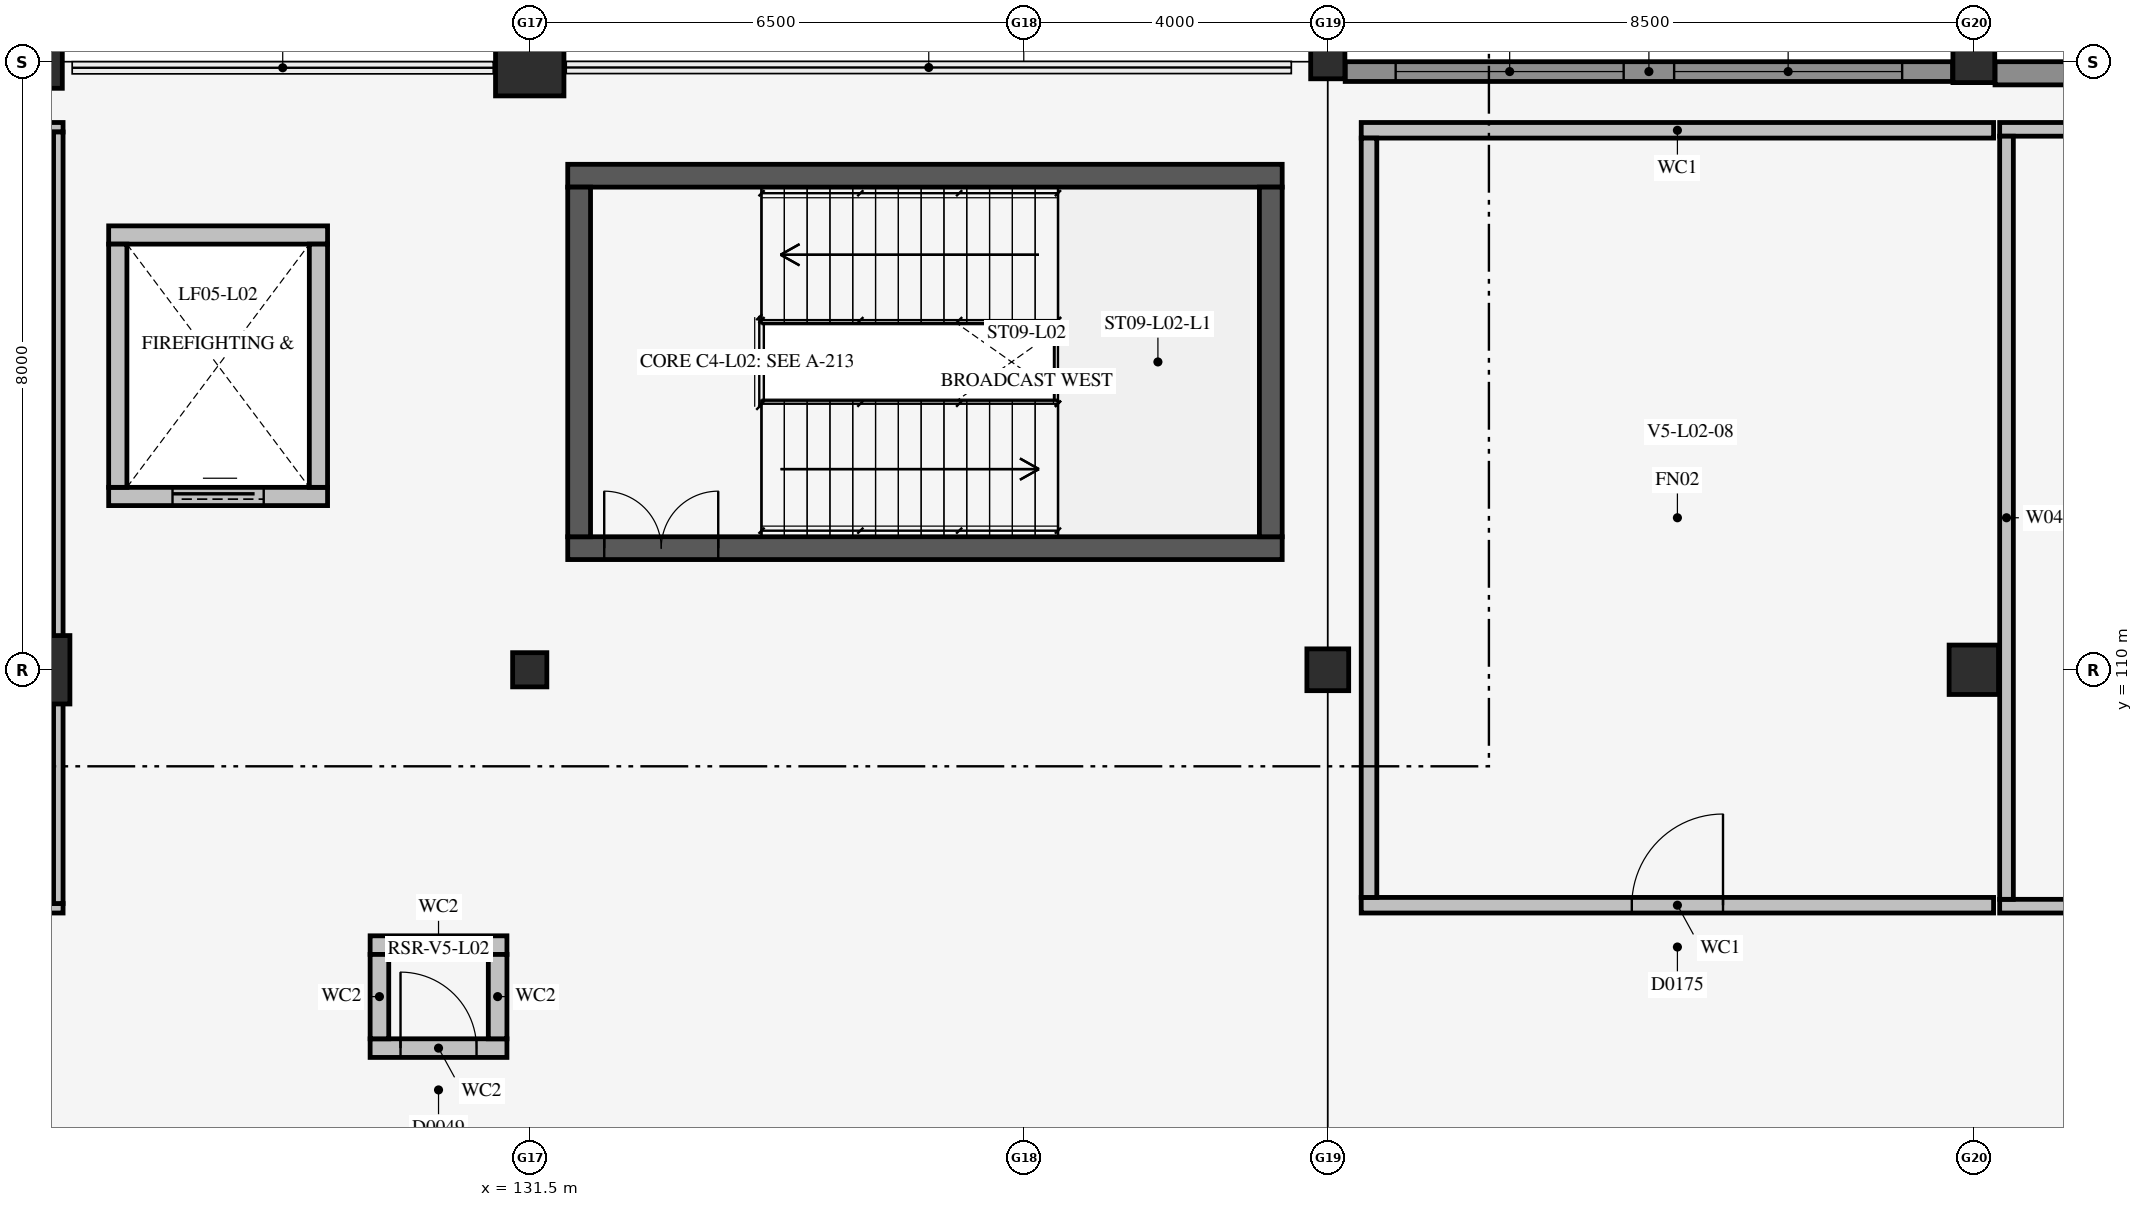
"""IFC4 building model, lengths in metres.
Left out: names, types, materials, properties, quantities, classifications, styles, units other than length and angle.
Written with IfcOpenShell. Run it as: python <this file> out.ifc"""

import sys

from ifc_helpers import new_model, si_unit, direction, frame, frame_2d, origin, origin_2d, place, context, subcontext, project, spatial, rectangle, circle, extrude, element, fill, save


model = new_model("IFC4")
c1 = context("Model", 3, precision=1e-05, world=origin(), true_north=direction((0.0, 1.0)))
c2 = subcontext(c1, "Body", "Model", "MODEL_VIEW")
j1 = project(units=[si_unit("LENGTHUNIT", "METRE"), si_unit("PLANEANGLEUNIT", "RADIAN")], contexts=[c1])
p1 = place(None, origin())
s1 = spatial("IfcSite", under=j1, at=p1, CompositionType="ELEMENT")
p2 = place(p1, origin())
s2 = spatial("IfcBuilding", under=s1, at=p2, CompositionType="ELEMENT")
p3 = place(p2, frame((0.0, 0.0, 10.2)))
s3 = spatial("IfcBuildingStorey", under=s2, at=p3, CompositionType="ELEMENT", Elevation=10.2)
p4 = place(p3, frame((132.0, 111.6, 0.0), z_axis=(0.0, 0.0, 1.0), x_axis=(1.0, 0.0, 0.0)))
e1 = element("IfcWall", 1, at=p4, inside=s3, PredefinedType="SHEAR", context=c2, shape_type="SweptSolid", body=[
    extrude(rectangle(XDim=9.4, YDim=0.3, at=frame_2d((4.7, 0.0))), origin(), (0.0, 0.0, 1.0), 4.38),
])
p5 = place(p4, frame((0.48, 0.0, 0.0)))
e2 = element("IfcOpeningElement", 2, at=p5, cuts=e1, PredefinedType="OPENING", context=c2, shape_type="SweptSolid", body=[
    extrude(rectangle(XDim=1.5, YDim=2.3, at=frame_2d((0.75, 1.15))), frame((0.0, 0.162, 0.0), z_axis=(0.0, -1.0, 0.0), x_axis=(1.0, 0.0, 0.0)), (0.0, 0.0, 1.0), 0.324),
])
p6 = place(p3, frame((132.0, 116.5, 0.0), z_axis=(0.0, 0.0, 1.0), x_axis=(1.0, 0.0, 0.0)))
e3 = element("IfcWall", 3, at=p6, inside=s3, PredefinedType="SHEAR", context=c2, shape_type="SweptSolid", body=[
    extrude(rectangle(XDim=9.4, YDim=0.3, at=frame_2d((4.7, 0.0))), origin(), (0.0, 0.0, 1.0), 4.38),
])
for number, where, z_axis, x_axis in (
    (4, (132.15, 111.75, 0.0), (0.0, 0.0, 1.0), (0.0, 1.0, 0.0)),
    (5, (141.25, 111.75, 0.0), (0.0, 0.0, 1.0), (0.0, 1.0, 0.0)),
):
    element("IfcWall", number, at=place(p3, frame(where, z_axis=z_axis, x_axis=x_axis)), inside=s3, PredefinedType="SHEAR", context=c2, shape_type="SweptSolid", body=[
        extrude(rectangle(XDim=4.6, YDim=0.3, at=frame_2d((2.3, 0.0))), origin(), (0.0, 0.0, 1.0), 4.38),
    ])
p7 = place(p3, frame((125.96, 112.28, 0.0), z_axis=(0.0, 0.0, 1.0), x_axis=(1.0, 0.0, 0.0)))
e6 = element("IfcWall", 6, at=p7, inside=s3, PredefinedType="SOLIDWALL", context=c2, shape_type="SweptSolid", body=[
    extrude(rectangle(XDim=2.88, YDim=0.24, at=frame_2d((1.44, 0.0))), origin(), (0.0, 0.0, 1.0), 4.6),
])
p8 = place(p7, frame((0.84, 0.0, 0.0)))
e7 = element("IfcOpeningElement", 7, at=p8, cuts=e6, PredefinedType="OPENING", context=c2, shape_type="SweptSolid", body=[
    extrude(rectangle(XDim=1.2, YDim=2.2, at=frame_2d((0.6, 1.1))), frame((0.0, 0.132, 0.0), z_axis=(0.0, -1.0, 0.0), x_axis=(1.0, 0.0, 0.0)), (0.0, 0.0, 1.0), 0.264),
])
p9 = place(p3, frame((125.96, 115.72, 0.0), z_axis=(0.0, 0.0, 1.0), x_axis=(1.0, 0.0, 0.0)))
e8 = element("IfcWall", 8, at=p9, inside=s3, PredefinedType="SOLIDWALL", context=c2, shape_type="SweptSolid", body=[
    extrude(rectangle(XDim=2.88, YDim=0.24, at=frame_2d((1.44, 0.0))), origin(), (0.0, 0.0, 1.0), 4.6),
])
for number, where, z_axis, x_axis in (
    (9, (126.08, 112.4, 0.0), (0.0, 0.0, 1.0), (0.0, 1.0, 0.0)),
    (10, (128.72, 112.4, 0.0), (0.0, 0.0, 1.0), (0.0, 1.0, 0.0)),
):
    element("IfcWall", number, at=place(p3, frame(where, z_axis=z_axis, x_axis=x_axis)), inside=s3, PredefinedType="SOLIDWALL", context=c2, shape_type="SweptSolid", body=[
        extrude(rectangle(XDim=3.2, YDim=0.24, at=frame_2d((1.6, 0.0))), origin(), (0.0, 0.0, 1.0), 4.6),
    ])
p10 = place(p3, frame((125.0, 110.0, 0.0), z_axis=(0.0, 0.0, 1.0), x_axis=(1.0, 0.0, 0.0)))
e11 = element("IfcColumn", 11, at=p10, inside=s3, PredefinedType="COLUMN", context=c2, shape_type="SweptSolid", body=[
    extrude(circle(Radius=0.45, at=origin_2d()), origin(), (0.0, 0.0, 1.0), 4.6),
])
p11 = place(p3, frame((125.0, 118.0, 0.0), z_axis=(0.0, 0.0, 1.0), x_axis=(1.0, 0.0, 0.0)))
e12 = element("IfcColumn", 12, at=p11, inside=s3, PredefinedType="COLUMN", context=c2, shape_type="SweptSolid", body=[
    extrude(circle(Radius=0.35, at=origin_2d()), origin(), (0.0, 0.0, 1.0), 4.6),
])
p12 = place(p3, frame((131.5, 110.0, 0.0), z_axis=(0.0, 0.0, 1.0), x_axis=(1.0, 0.0, 0.0)))
e13 = element("IfcColumn", 13, at=p12, inside=s3, PredefinedType="COLUMN", context=c2, shape_type="SweptSolid", body=[
    extrude(rectangle(XDim=0.45, YDim=0.45, at=origin_2d()), origin(), (0.0, 0.0, 1.0), 4.6),
])
p13 = place(p3, frame((131.5, 118.0, 0.0), z_axis=(0.0, 0.0, 1.0), x_axis=(1.0, 0.0, 0.0)))
e14 = element("IfcColumn", 14, at=p13, inside=s3, PredefinedType="COLUMN", context=c2, shape_type="SweptSolid", body=[
    extrude(circle(Radius=0.45, at=origin_2d()), origin(), (0.0, 0.0, 1.0), 4.6),
])
p14 = place(p3, frame((142.0, 110.0, 0.0), z_axis=(0.0, 0.0, 1.0), x_axis=(1.0, 0.0, 0.0)))
e15 = element("IfcColumn", 15, at=p14, inside=s3, PredefinedType="COLUMN", context=c2, shape_type="SweptSolid", body=[
    extrude(rectangle(XDim=0.55, YDim=0.55, at=origin_2d()), origin(), (0.0, 0.0, 1.0), 4.6),
])
p15 = place(p3, frame((142.0, 118.0, 0.0), z_axis=(0.0, 0.0, 1.0), x_axis=(1.0, 0.0, 0.0)))
e16 = element("IfcColumn", 16, at=p15, inside=s3, PredefinedType="COLUMN", context=c2, shape_type="SweptSolid", body=[
    extrude(rectangle(XDim=0.45, YDim=0.45, at=origin_2d()), origin(), (0.0, 0.0, 1.0), 4.6),
])
p16 = place(p3, frame((150.5, 110.0, 0.0), z_axis=(0.0, 0.0, 1.0), x_axis=(1.0, 0.0, 0.0)))
e17 = element("IfcColumn", 17, at=p16, inside=s3, PredefinedType="COLUMN", context=c2, shape_type="SweptSolid", body=[
    extrude(rectangle(XDim=0.65, YDim=0.65, at=origin_2d()), origin(), (0.0, 0.0, 1.0), 4.6),
])
p17 = place(p3, frame((150.5, 118.0, 0.0), z_axis=(0.0, 0.0, 1.0), x_axis=(1.0, 0.0, 0.0)))
e18 = element("IfcColumn", 18, at=p17, inside=s3, PredefinedType="COLUMN", context=c2, shape_type="SweptSolid", body=[
    extrude(rectangle(XDim=0.55, YDim=0.55, at=origin_2d()), origin(), (0.0, 0.0, 1.0), 4.6),
])
p18 = place(p3, frame((129.4, 105.022, 0.0), z_axis=(0.0, 0.0, 1.0), x_axis=(1.0, 0.0, 0.0)))
e19 = element("IfcWall", 19, at=p18, inside=s3, PredefinedType="SOLIDWALL", context=c2, shape_type="SweptSolid", body=[
    extrude(rectangle(XDim=1.8, YDim=0.245, at=frame_2d((0.9, 0.0))), origin(), (0.0, 0.0, 1.0), 4.365),
])
p19 = place(p18, frame((0.4, 0.0, 0.0)))
e20 = element("IfcOpeningElement", 20, at=p19, cuts=e19, PredefinedType="OPENING", context=c2, shape_type="SweptSolid", body=[
    extrude(rectangle(XDim=1.0, YDim=2.2, at=frame_2d((0.5, 1.1))), frame((0.0, 0.135, 0.0), z_axis=(0.0, -1.0, 0.0), x_axis=(1.0, 0.0, 0.0)), (0.0, 0.0, 1.0), 0.269),
])
p20 = place(p3, frame((129.4, 106.377, 0.0), z_axis=(0.0, 0.0, 1.0), x_axis=(1.0, 0.0, 0.0)))
e21 = element("IfcWall", 21, at=p20, inside=s3, PredefinedType="SOLIDWALL", context=c2, shape_type="SweptSolid", body=[
    extrude(rectangle(XDim=1.8, YDim=0.245, at=frame_2d((0.9, 0.0))), origin(), (0.0, 0.0, 1.0), 4.365),
])
for number, where, z_axis, x_axis in (
    (22, (131.077, 105.145, 0.0), (0.0, 0.0, 1.0), (0.0, 1.0, 0.0)),
    (23, (129.522, 105.145, 0.0), (0.0, 0.0, 1.0), (0.0, 1.0, 0.0)),
):
    element("IfcWall", number, at=place(p3, frame(where, z_axis=z_axis, x_axis=x_axis)), inside=s3, PredefinedType="SOLIDWALL", context=c2, shape_type="SweptSolid", body=[
        extrude(rectangle(XDim=1.11, YDim=0.245, at=frame_2d((0.555, 0.0))), origin(), (0.0, 0.0, 1.0), 4.365),
    ])
p21 = place(p3, frame((112.14, 106.863, 0.0), z_axis=(0.0, 0.0, 1.0), x_axis=(1.0, 0.0, 0.0)))
e24 = element("IfcWall", 24, at=p21, inside=s3, PredefinedType="PARTITIONING", context=c2, shape_type="SweptSolid", body=[
    extrude(rectangle(XDim=13.22, YDim=0.125, at=frame_2d((6.61, 0.0))), origin(), (0.0, 0.0, 1.0), 4.365),
])
p22 = place(p21, frame((7.413, 0.0, 0.0)))
e25 = element("IfcOpeningElement", 25, at=p22, cuts=e24, PredefinedType="OPENING", context=c2, shape_type="SweptSolid", body=[
    extrude(rectangle(XDim=1.05, YDim=2.15, at=frame_2d((0.525, 1.075))), frame((0.0, 0.074, 0.0), z_axis=(0.0, -1.0, 0.0), x_axis=(1.0, 0.0, 0.0)), (0.0, 0.0, 1.0), 0.149),
])
p23 = place(p3, frame((112.14, 117.137, 0.0), z_axis=(0.0, 0.0, 1.0), x_axis=(1.0, 0.0, 0.0)))
e26 = element("IfcWall", 26, at=p23, inside=s3, PredefinedType="PARTITIONING", context=c2, shape_type="SweptSolid", body=[
    extrude(rectangle(XDim=13.22, YDim=0.125, at=frame_2d((6.61, 0.0))), origin(), (0.0, 0.0, 1.0), 4.365),
])
p24 = place(p3, frame((125.298, 106.925, 0.0), z_axis=(0.0, 0.0, 1.0), x_axis=(0.0, 1.0, 0.0)))
e27 = element("IfcWall", 27, at=p24, inside=s3, PredefinedType="PARTITIONING", context=c2, shape_type="SweptSolid", body=[
    extrude(rectangle(XDim=10.15, YDim=0.125, at=frame_2d((5.075, 0.0))), origin(), (0.0, 0.0, 1.0), 4.365),
])
p25 = place(p3, frame((142.44, 106.903, 0.0), z_axis=(0.0, 0.0, 1.0), x_axis=(1.0, 0.0, 0.0)))
e28 = element("IfcWall", 28, at=p25, inside=s3, PredefinedType="SOLIDWALL", context=c2, shape_type="SweptSolid", body=[
    extrude(rectangle(XDim=8.32, YDim=0.205, at=frame_2d((4.16, 0.0))), origin(), (0.0, 0.0, 1.0), 4.365),
])
p26 = place(p25, frame((3.56, 0.0, 0.0)))
e29 = element("IfcOpeningElement", 29, at=p26, cuts=e28, PredefinedType="OPENING", context=c2, shape_type="SweptSolid", body=[
    extrude(rectangle(XDim=1.2, YDim=2.2, at=frame_2d((0.6, 1.1))), frame((0.0, 0.115, 0.0), z_axis=(0.0, -1.0, 0.0), x_axis=(1.0, 0.0, 0.0)), (0.0, 0.0, 1.0), 0.229),
])
p27 = place(p3, frame((142.44, 117.097, 0.0), z_axis=(0.0, 0.0, 1.0), x_axis=(1.0, 0.0, 0.0)))
e30 = element("IfcWall", 30, at=p27, inside=s3, PredefinedType="SOLIDWALL", context=c2, shape_type="SweptSolid", body=[
    extrude(rectangle(XDim=8.32, YDim=0.205, at=frame_2d((4.16, 0.0))), origin(), (0.0, 0.0, 1.0), 4.365),
])
p28 = place(p3, frame((142.542, 107.005, 0.0), z_axis=(0.0, 0.0, 1.0), x_axis=(0.0, 1.0, 0.0)))
e31 = element("IfcWall", 31, at=p28, inside=s3, PredefinedType="SOLIDWALL", context=c2, shape_type="SweptSolid", body=[
    extrude(rectangle(XDim=9.99, YDim=0.205, at=frame_2d((4.995, 0.0))), origin(), (0.0, 0.0, 1.0), 4.365),
])
p29 = place(p3, frame((150.84, 106.89, 0.0), z_axis=(0.0, 0.0, 1.0), x_axis=(1.0, 0.0, 0.0)))
e32 = element("IfcWall", 32, at=p29, inside=s3, PredefinedType="PARTITIONING", context=c2, shape_type="SweptSolid", body=[
    extrude(rectangle(XDim=8.32, YDim=0.18, at=frame_2d((4.16, 0.0))), origin(), (0.0, 0.0, 1.0), 4.365),
])
p30 = place(p29, frame((3.66, 0.0, 0.0)))
e33 = element("IfcOpeningElement", 33, at=p30, cuts=e32, PredefinedType="OPENING", context=c2, shape_type="SweptSolid", body=[
    extrude(rectangle(XDim=1.0, YDim=2.2, at=frame_2d((0.5, 1.1))), frame((0.0, 0.102, 0.0), z_axis=(0.0, -1.0, 0.0), x_axis=(1.0, 0.0, 0.0)), (0.0, 0.0, 1.0), 0.204),
])
p31 = place(p3, frame((150.84, 117.11, 0.0), z_axis=(0.0, 0.0, 1.0), x_axis=(1.0, 0.0, 0.0)))
e34 = element("IfcWall", 34, at=p31, inside=s3, PredefinedType="PARTITIONING", context=c2, shape_type="SweptSolid", body=[
    extrude(rectangle(XDim=8.32, YDim=0.18, at=frame_2d((4.16, 0.0))), origin(), (0.0, 0.0, 1.0), 4.365),
])
p32 = place(p3, frame((150.93, 106.98, 0.0), z_axis=(0.0, 0.0, 1.0), x_axis=(0.0, 1.0, 0.0)))
e35 = element("IfcWall", 35, at=p32, inside=s3, PredefinedType="PARTITIONING", context=c2, shape_type="SweptSolid", body=[
    extrude(rectangle(XDim=10.04, YDim=0.18, at=frame_2d((5.02, 0.0))), origin(), (0.0, 0.0, 1.0), 4.365),
])
p33 = place(p3, frame((142.229, 117.87, 0.0), z_axis=(0.0, 0.0, 1.0), x_axis=(1.0, 0.0, 0.0)))
e36 = element("IfcWall", 36, at=p33, inside=s3, PredefinedType="SOLIDWALL", context=c2, shape_type="SweptSolid", body=[
    extrude(rectangle(XDim=7.992, YDim=0.26, at=frame_2d((3.996, 0.0))), origin(), (0.0, 0.0, 1.0), 3.814),
])
p34 = place(p33, frame((0.664, 0.0, 0.95)))
e37 = element("IfcOpeningElement", 37, at=p34, cuts=e36, PredefinedType="OPENING", context=c2, shape_type="SweptSolid", body=[
    extrude(rectangle(XDim=3.0, YDim=1.5, at=frame_2d((1.5, 0.75))), frame((0.0, 0.142, 0.0), z_axis=(0.0, -1.0, 0.0), x_axis=(1.0, 0.0, 0.0)), (0.0, 0.0, 1.0), 0.284),
])
p35 = place(p33, frame((4.328, 0.0, 0.95)))
e38 = element("IfcOpeningElement", 38, at=p35, cuts=e36, PredefinedType="OPENING", context=c2, shape_type="SweptSolid", body=[
    extrude(rectangle(XDim=3.0, YDim=1.5, at=frame_2d((1.5, 0.75))), frame((0.0, 0.142, 0.0), z_axis=(0.0, -1.0, 0.0), x_axis=(1.0, 0.0, 0.0)), (0.0, 0.0, 1.0), 0.284),
])
p36 = place(p3, frame((150.779, 117.847, 0.0), z_axis=(0.0, 0.0, 1.0), x_axis=(1.0, 0.0, 0.0)))
e39 = element("IfcWall", 39, at=p36, inside=s3, PredefinedType="SOLIDWALL", context=c2, shape_type="SweptSolid", body=[
    extrude(rectangle(XDim=7.892, YDim=0.305, at=frame_2d((3.946, 0.0))), origin(), (0.0, 0.0, 1.0), 3.738),
])
p37 = place(p36, frame((1.431, 0.0, 0.95)))
e40 = element("IfcOpeningElement", 40, at=p37, cuts=e39, PredefinedType="OPENING", context=c2, shape_type="SweptSolid", body=[
    extrude(rectangle(XDim=1.8, YDim=1.8, at=frame_2d((0.9, 0.9))), frame((0.0, 0.165, 0.0), z_axis=(0.0, -1.0, 0.0), x_axis=(1.0, 0.0, 0.0)), (0.0, 0.0, 1.0), 0.329),
])
p38 = place(p36, frame((4.661, 0.0, 0.95)))
e41 = element("IfcOpeningElement", 41, at=p38, cuts=e39, PredefinedType="OPENING", context=c2, shape_type="SweptSolid", body=[
    extrude(rectangle(XDim=1.8, YDim=1.8, at=frame_2d((0.9, 0.9))), frame((0.0, 0.165, 0.0), z_axis=(0.0, -1.0, 0.0), x_axis=(1.0, 0.0, 0.0)), (0.0, 0.0, 1.0), 0.329),
])
p39 = place(p5, origin())
e42 = element("IfcDoor", 42, at=p39, inside=s3, OperationType="DOUBLE_DOOR_SINGLE_SWING", PredefinedType="DOOR", context=c2, shape_type="SweptSolid", body=[
    extrude(rectangle(XDim=1.5, YDim=2.3, at=frame_2d((0.75, 1.15))), frame((0.0, 0.025, 0.0), z_axis=(0.0, -1.0, 0.0), x_axis=(1.0, 0.0, 0.0)), (0.0, 0.0, 1.0), 0.05),
])
fill(e2, e42)
p40 = place(p19, origin())
e43 = element("IfcDoor", 43, at=p40, inside=s3, OperationType="SINGLE_SWING_LEFT", PredefinedType="DOOR", context=c2, shape_type="SweptSolid", body=[
    extrude(rectangle(XDim=1.0, YDim=2.2, at=frame_2d((0.5, 1.1))), frame((0.0, 0.025, 0.0), z_axis=(0.0, -1.0, 0.0), x_axis=(1.0, 0.0, 0.0)), (0.0, 0.0, 1.0), 0.05),
])
fill(e20, e43)
p41 = place(p26, origin())
e44 = element("IfcDoor", 44, at=p41, inside=s3, OperationType="SINGLE_SWING_RIGHT", PredefinedType="DOOR", context=c2, shape_type="SweptSolid", body=[
    extrude(rectangle(XDim=1.2, YDim=2.2, at=frame_2d((0.6, 1.1))), frame((0.0, 0.025, 0.0), z_axis=(0.0, -1.0, 0.0), x_axis=(1.0, 0.0, 0.0)), (0.0, 0.0, 1.0), 0.05),
])
fill(e29, e44)
p42 = place(p34, origin())
e45 = element("IfcWindow", 45, at=p42, inside=s3, PartitioningType="SINGLE_PANEL", PredefinedType="WINDOW", context=c2, shape_type="SweptSolid", body=[
    extrude(rectangle(XDim=3.0, YDim=1.5, at=frame_2d((1.5, 0.75))), frame((0.0, 0.03, 0.0), z_axis=(0.0, -1.0, 0.0), x_axis=(1.0, 0.0, 0.0)), (0.0, 0.0, 1.0), 0.06),
])
fill(e37, e45)
p43 = place(p35, origin())
e46 = element("IfcWindow", 46, at=p43, inside=s3, PartitioningType="SINGLE_PANEL", PredefinedType="WINDOW", context=c2, shape_type="SweptSolid", body=[
    extrude(rectangle(XDim=3.0, YDim=1.5, at=frame_2d((1.5, 0.75))), frame((0.0, 0.03, 0.0), z_axis=(0.0, -1.0, 0.0), x_axis=(1.0, 0.0, 0.0)), (0.0, 0.0, 1.0), 0.06),
])
fill(e38, e46)
p44 = place(p8, origin())
e47 = element("IfcDoor", 47, at=p44, inside=s3, OperationType="SLIDING_TO_LEFT", PredefinedType="USERDEFINED", context=c2, shape_type="SweptSolid", body=[
    extrude(rectangle(XDim=1.2, YDim=2.2, at=frame_2d((0.6, 1.1))), frame((0.0, 0.025, 0.0), z_axis=(0.0, -1.0, 0.0), x_axis=(1.0, 0.0, 0.0)), (0.0, 0.0, 1.0), 0.05),
])
fill(e7, e47)
save(model, sys.argv[1])
